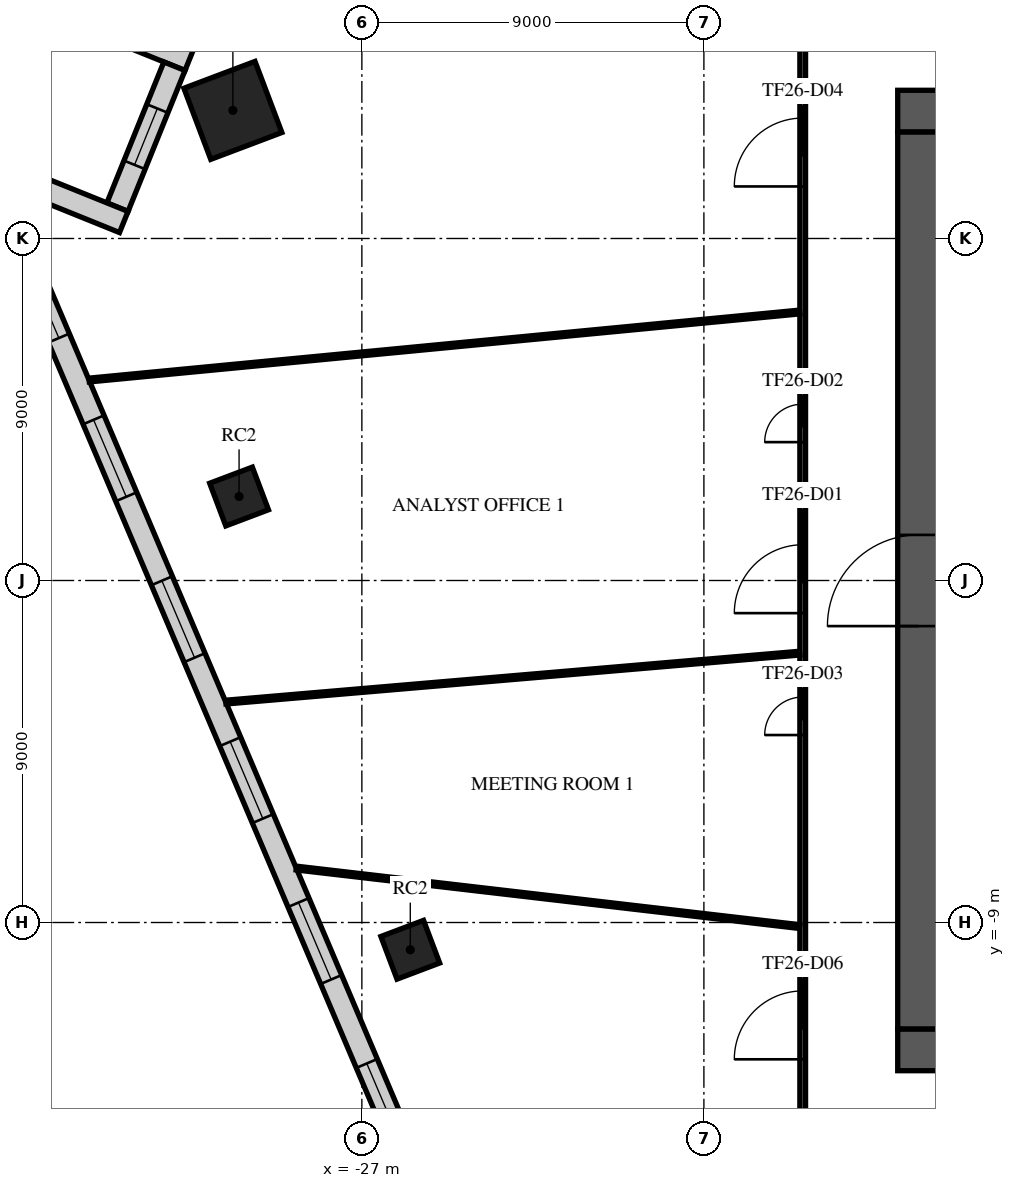
"""IFC4 building model, lengths in metres.
Left out: names, types, materials, properties, quantities, classifications, styles, units other than length and angle.
Written with IfcOpenShell. Run it as: python <this file> out.ifc"""

import sys

from ifc_helpers import new_model, si_unit, direction, frame, frame_2d, origin, origin_2d, place, context, subcontext, project, spatial, rectangle, extrude, element, fill, save


model = new_model("IFC4")
c1 = context("Model", 3, precision=1e-05, world=origin(), true_north=direction((0.0, 1.0)))
c2 = subcontext(c1, "Body", "Model", "MODEL_VIEW")
j1 = project(units=[si_unit("LENGTHUNIT", "METRE"), si_unit("PLANEANGLEUNIT", "RADIAN")], contexts=[c1])
p1 = place(None, origin())
s1 = spatial("IfcSite", under=j1, at=p1, CompositionType="ELEMENT")
p2 = place(p1, origin())
s2 = spatial("IfcBuilding", under=s1, at=p2, CompositionType="ELEMENT")
p3 = place(p2, frame((0.0, 0.0, 114.1)))
s3 = spatial("IfcBuildingStorey", under=s2, at=p3, CompositionType="ELEMENT", Elevation=114.1)
p4 = place(p3, frame((-30.394, 12.371, 0.0), z_axis=(0.0, 0.0, 1.0), x_axis=(0.935491525991, 0.353349125935, 0.0)))
e1 = element("IfcColumn", 1, at=p4, inside=s3, PredefinedType="COLUMN", context=c2, shape_type="SweptSolid", body=[
    extrude(rectangle(XDim=2.0, YDim=2.0, at=origin_2d()), origin(), (0.0, 0.0, 1.0), 4.0),
])
for number, where, z_axis, x_axis in (
    (2, (-30.231, 2.21, 0.0), (0.0, 0.0, 1.0), (0.935, 0.353, 0.0)),
    (3, (-25.726, -9.717, 0.0), (0.0, 0.0, 1.0), (0.935, 0.353, 0.0)),
):
    element("IfcColumn", number, at=place(p3, frame(where, z_axis=z_axis, x_axis=x_axis)), inside=s3, PredefinedType="COLUMN", context=c2, shape_type="SweptSolid", body=[
        extrude(rectangle(XDim=1.2, YDim=1.2, at=origin_2d()), origin(), (0.0, 0.0, 1.0), 4.0),
    ])
p5 = place(p3, frame((-12.9, 12.35, 0.0), z_axis=(0.0, 0.0, 1.0), x_axis=(1.0, 0.0, 0.0)))
e4 = element("IfcWall", 4, at=p5, inside=s3, PredefinedType="SHEAR", context=c2, shape_type="SweptSolid", body=[
    extrude(rectangle(XDim=25.8, YDim=1.1, at=frame_2d((12.9, 0.0))), origin(), (0.0, 0.0, 1.0), 3.58),
])
p6 = place(p5, frame((11.7, 0.0, 0.0)))
e5 = element("IfcOpeningElement", 5, at=p6, cuts=e4, PredefinedType="OPENING", context=c2, shape_type="SweptSolid", body=[
    extrude(rectangle(XDim=2.4, YDim=2.4, at=frame_2d((1.2, 1.2))), frame((0.0, 0.56, 0.0), z_axis=(0.0, -1.0, 0.0), x_axis=(1.0, 0.0, 0.0)), (0.0, 0.0, 1.0), 1.12),
])
p7 = place(p5, frame((22.525, 0.0, 0.0)))
e6 = element("IfcOpeningElement", 6, at=p7, cuts=e4, PredefinedType="OPENING", context=c2, shape_type="SweptSolid", body=[
    extrude(rectangle(XDim=1.2, YDim=2.1, at=frame_2d((0.6, 1.05))), frame((0.0, 0.56, 0.0), z_axis=(0.0, -1.0, 0.0), x_axis=(1.0, 0.0, 0.0)), (0.0, 0.0, 1.0), 1.12),
])
p8 = place(p5, frame((1.5, 0.0, 0.0)))
e7 = element("IfcOpeningElement", 7, at=p8, cuts=e4, PredefinedType="OPENING", context=c2, shape_type="SweptSolid", body=[
    extrude(rectangle(XDim=1.0, YDim=2.1, at=frame_2d((0.5, 1.05))), frame((0.0, 0.56, 0.0), z_axis=(0.0, -1.0, 0.0), x_axis=(1.0, 0.0, 0.0)), (0.0, 0.0, 1.0), 1.12),
])
p9 = place(p3, frame((-12.9, -12.35, 0.0), z_axis=(0.0, 0.0, 1.0), x_axis=(1.0, 0.0, 0.0)))
e8 = element("IfcWall", 8, at=p9, inside=s3, PredefinedType="SHEAR", context=c2, shape_type="SweptSolid", body=[
    extrude(rectangle(XDim=25.8, YDim=1.1, at=frame_2d((12.9, 0.0))), origin(), (0.0, 0.0, 1.0), 3.58),
])
p10 = place(p9, frame((7.8, 0.0, 0.0)))
e9 = element("IfcOpeningElement", 9, at=p10, cuts=e8, PredefinedType="OPENING", context=c2, shape_type="SweptSolid", body=[
    extrude(rectangle(XDim=2.0, YDim=2.1, at=frame_2d((1.0, 1.05))), frame((0.0, 0.56, 0.0), z_axis=(0.0, -1.0, 0.0), x_axis=(1.0, 0.0, 0.0)), (0.0, 0.0, 1.0), 1.12),
])
p11 = place(p9, frame((17.925, 0.0, 0.0)))
e10 = element("IfcOpeningElement", 10, at=p11, cuts=e8, PredefinedType="OPENING", context=c2, shape_type="SweptSolid", body=[
    extrude(rectangle(XDim=1.2, YDim=2.1, at=frame_2d((0.6, 1.05))), frame((0.0, 0.56, 0.0), z_axis=(0.0, -1.0, 0.0), x_axis=(1.0, 0.0, 0.0)), (0.0, 0.0, 1.0), 1.12),
])
p12 = place(p9, frame((2.075, 0.0, 0.0)))
e11 = element("IfcOpeningElement", 11, at=p12, cuts=e8, PredefinedType="OPENING", context=c2, shape_type="SweptSolid", body=[
    extrude(rectangle(XDim=1.2, YDim=2.1, at=frame_2d((0.6, 1.05))), frame((0.0, 0.56, 0.0), z_axis=(0.0, -1.0, 0.0), x_axis=(1.0, 0.0, 0.0)), (0.0, 0.0, 1.0), 1.12),
])
p13 = place(p9, frame((22.525, 0.0, 0.0)))
e12 = element("IfcOpeningElement", 12, at=p13, cuts=e8, PredefinedType="OPENING", context=c2, shape_type="SweptSolid", body=[
    extrude(rectangle(XDim=1.2, YDim=2.1, at=frame_2d((0.6, 1.05))), frame((0.0, 0.56, 0.0), z_axis=(0.0, -1.0, 0.0), x_axis=(1.0, 0.0, 0.0)), (0.0, 0.0, 1.0), 1.12),
])
p14 = place(p3, frame((-12.35, -11.8, 0.0), z_axis=(0.0, 0.0, 1.0), x_axis=(0.0, 1.0, 0.0)))
e13 = element("IfcWall", 13, at=p14, inside=s3, PredefinedType="SHEAR", context=c2, shape_type="SweptSolid", body=[
    extrude(rectangle(XDim=23.6, YDim=1.1, at=frame_2d((11.8, 0.0))), origin(), (0.0, 0.0, 1.0), 3.58),
])
p15 = place(p14, frame((10.6, 0.0, 0.0)))
e14 = element("IfcOpeningElement", 14, at=p15, cuts=e13, PredefinedType="OPENING", context=c2, shape_type="SweptSolid", body=[
    extrude(rectangle(XDim=2.4, YDim=2.4, at=frame_2d((1.2, 1.2))), frame((0.0, 0.56, 0.0), z_axis=(0.0, -1.0, 0.0), x_axis=(1.0, 0.0, 0.0)), (0.0, 0.0, 1.0), 1.12),
])
p16 = place(p3, frame((-33.86, 14.635, 0.0), z_axis=(0.0, 0.0, 1.0), x_axis=(0.927177918056, -0.374621286461, 0.0)))
e15 = element("IfcWall", 15, at=p16, inside=s3, PredefinedType="STANDARD", context=c2, shape_type="SweptSolid", body=[
    extrude(rectangle(XDim=2.5, YDim=0.6, at=frame_2d((1.25, 0.0))), origin(), (0.0, 0.0, 1.0), 3.58),
])
p17 = place(p3, frame((-31.932, 13.533, 0.0), z_axis=(0.0, 0.0, 1.0), x_axis=(-0.374629554127, -0.927174577507, 0.0)))
e16 = element("IfcWall", 16, at=p17, inside=s3, PredefinedType="STANDARD", context=c2, shape_type="SweptSolid", body=[
    extrude(rectangle(XDim=4.0, YDim=0.6, at=frame_2d((2.0, 0.0))), origin(), (0.0, 0.0, 1.0), 3.58),
])
p18 = place(p17, frame((1.2, 0.0, 0.9)))
e17 = element("IfcOpeningElement", 17, at=p18, cuts=e16, PredefinedType="OPENING", context=c2, shape_type="SweptSolid", body=[
    extrude(rectangle(XDim=1.6, YDim=2.1, at=frame_2d((0.8, 1.05))), frame((0.0, 0.31, 0.0), z_axis=(0.0, -1.0, 0.0), x_axis=(1.0, 0.0, 0.0)), (0.0, 0.0, 1.0), 0.62),
])
p19 = place(p3, frame((-33.265, 9.434, 0.0), z_axis=(0.0, 0.0, 1.0), x_axis=(-0.927177918056, 0.374621286461, 0.0)))
e18 = element("IfcWall", 18, at=p19, inside=s3, PredefinedType="STANDARD", context=c2, shape_type="SweptSolid", body=[
    extrude(rectangle(XDim=2.5, YDim=0.6, at=frame_2d((1.25, 0.0))), origin(), (0.0, 0.0, 1.0), 3.58),
])
p20 = place(p3, frame((-36.277, 9.452, 0.0), z_axis=(0.0, 0.0, 1.0), x_axis=(0.39073607599, -0.920502753347, 0.0)))
e19 = element("IfcWall", 19, at=p20, inside=s3, PredefinedType="STANDARD", context=c2, shape_type="SweptSolid", body=[
    extrude(rectangle(XDim=45.751, YDim=0.6, at=frame_2d((22.876, 0.0))), origin(), (0.0, 0.0, 1.0), 3.58),
])
p21 = place(p20, frame((1.138, 0.0, 0.9)))
e20 = element("IfcOpeningElement", 20, at=p21, cuts=e19, PredefinedType="OPENING", context=c2, shape_type="SweptSolid", body=[
    extrude(rectangle(XDim=2.2, YDim=2.1, at=frame_2d((1.1, 1.05))), frame((0.0, 0.31, 0.0), z_axis=(0.0, -1.0, 0.0), x_axis=(1.0, 0.0, 0.0)), (0.0, 0.0, 1.0), 0.62),
])
p22 = place(p20, frame((5.676, 0.0, 0.9)))
e21 = element("IfcOpeningElement", 21, at=p22, cuts=e19, PredefinedType="OPENING", context=c2, shape_type="SweptSolid", body=[
    extrude(rectangle(XDim=2.2, YDim=2.1, at=frame_2d((1.1, 1.05))), frame((0.0, 0.31, 0.0), z_axis=(0.0, -1.0, 0.0), x_axis=(1.0, 0.0, 0.0)), (0.0, 0.0, 1.0), 0.62),
])
p23 = place(p20, frame((10.276, 0.0, 0.9)))
e22 = element("IfcOpeningElement", 22, at=p23, cuts=e19, PredefinedType="OPENING", context=c2, shape_type="SweptSolid", body=[
    extrude(rectangle(XDim=2.2, YDim=2.1, at=frame_2d((1.1, 1.05))), frame((0.0, 0.31, 0.0), z_axis=(0.0, -1.0, 0.0), x_axis=(1.0, 0.0, 0.0)), (0.0, 0.0, 1.0), 0.62),
])
p24 = place(p20, frame((14.876, 0.0, 0.9)))
e23 = element("IfcOpeningElement", 23, at=p24, cuts=e19, PredefinedType="OPENING", context=c2, shape_type="SweptSolid", body=[
    extrude(rectangle(XDim=2.2, YDim=2.1, at=frame_2d((1.1, 1.05))), frame((0.0, 0.31, 0.0), z_axis=(0.0, -1.0, 0.0), x_axis=(1.0, 0.0, 0.0)), (0.0, 0.0, 1.0), 0.62),
])
p25 = place(p20, frame((19.476, 0.0, 0.9)))
e24 = element("IfcOpeningElement", 24, at=p25, cuts=e19, PredefinedType="OPENING", context=c2, shape_type="SweptSolid", body=[
    extrude(rectangle(XDim=2.2, YDim=2.1, at=frame_2d((1.1, 1.05))), frame((0.0, 0.31, 0.0), z_axis=(0.0, -1.0, 0.0), x_axis=(1.0, 0.0, 0.0)), (0.0, 0.0, 1.0), 0.62),
])
p26 = place(p20, frame((24.076, 0.0, 0.9)))
e25 = element("IfcOpeningElement", 25, at=p26, cuts=e19, PredefinedType="OPENING", context=c2, shape_type="SweptSolid", body=[
    extrude(rectangle(XDim=2.2, YDim=2.1, at=frame_2d((1.1, 1.05))), frame((0.0, 0.31, 0.0), z_axis=(0.0, -1.0, 0.0), x_axis=(1.0, 0.0, 0.0)), (0.0, 0.0, 1.0), 0.62),
])
p27 = place(p20, frame((28.676, 0.0, 0.9)))
e26 = element("IfcOpeningElement", 26, at=p27, cuts=e19, PredefinedType="OPENING", context=c2, shape_type="SweptSolid", body=[
    extrude(rectangle(XDim=2.2, YDim=2.1, at=frame_2d((1.1, 1.05))), frame((0.0, 0.31, 0.0), z_axis=(0.0, -1.0, 0.0), x_axis=(1.0, 0.0, 0.0)), (0.0, 0.0, 1.0), 0.62),
])
p28 = place(p20, frame((33.276, 0.0, 0.9)))
e27 = element("IfcOpeningElement", 27, at=p28, cuts=e19, PredefinedType="OPENING", context=c2, shape_type="SweptSolid", body=[
    extrude(rectangle(XDim=2.2, YDim=2.1, at=frame_2d((1.1, 1.05))), frame((0.0, 0.31, 0.0), z_axis=(0.0, -1.0, 0.0), x_axis=(1.0, 0.0, 0.0)), (0.0, 0.0, 1.0), 0.62),
])
p29 = place(p20, frame((37.876, 0.0, 0.9)))
e28 = element("IfcOpeningElement", 28, at=p29, cuts=e19, PredefinedType="OPENING", context=c2, shape_type="SweptSolid", body=[
    extrude(rectangle(XDim=2.2, YDim=2.1, at=frame_2d((1.1, 1.05))), frame((0.0, 0.31, 0.0), z_axis=(0.0, -1.0, 0.0), x_axis=(1.0, 0.0, 0.0)), (0.0, 0.0, 1.0), 0.62),
])
p30 = place(p20, frame((42.414, 0.0, 0.9)))
e29 = element("IfcOpeningElement", 29, at=p30, cuts=e19, PredefinedType="OPENING", context=c2, shape_type="SweptSolid", body=[
    extrude(rectangle(XDim=2.2, YDim=2.1, at=frame_2d((1.1, 1.05))), frame((0.0, 0.31, 0.0), z_axis=(0.0, -1.0, 0.0), x_axis=(1.0, 0.0, 0.0)), (0.0, 0.0, 1.0), 0.62),
])
p31 = place(p3, frame((-15.4, -15.4, 0.0), z_axis=(0.0, 0.0, 1.0), x_axis=(0.0, 1.0, 0.0)))
e30 = element("IfcWall", 30, at=p31, inside=s3, PredefinedType="PARTITIONING", context=c2, shape_type="SweptSolid", body=[
    extrude(rectangle(XDim=30.8, YDim=0.15, at=frame_2d((15.4, 0.0))), origin(), (0.0, 0.0, 1.0), 3.08),
])
p32 = place(p31, frame((14.541, 0.0, 0.0)))
e31 = element("IfcOpeningElement", 31, at=p32, cuts=e30, PredefinedType="OPENING", context=c2, shape_type="SweptSolid", body=[
    extrude(rectangle(XDim=1.8, YDim=2.1, at=frame_2d((0.9, 1.05))), frame((0.0, 0.085, 0.0), z_axis=(0.0, -1.0, 0.0), x_axis=(1.0, 0.0, 0.0)), (0.0, 0.0, 1.0), 0.17),
])
p33 = place(p31, frame((19.041, 0.0, 0.0)))
e32 = element("IfcOpeningElement", 32, at=p33, cuts=e30, PredefinedType="OPENING", context=c2, shape_type="SweptSolid", body=[
    extrude(rectangle(XDim=1.0, YDim=2.1, at=frame_2d((0.5, 1.05))), frame((0.0, 0.085, 0.0), z_axis=(0.0, -1.0, 0.0), x_axis=(1.0, 0.0, 0.0)), (0.0, 0.0, 1.0), 0.17),
])
p34 = place(p31, frame((11.333, 0.0, 0.0)))
e33 = element("IfcOpeningElement", 33, at=p34, cuts=e30, PredefinedType="OPENING", context=c2, shape_type="SweptSolid", body=[
    extrude(rectangle(XDim=1.0, YDim=2.1, at=frame_2d((0.5, 1.05))), frame((0.0, 0.085, 0.0), z_axis=(0.0, -1.0, 0.0), x_axis=(1.0, 0.0, 0.0)), (0.0, 0.0, 1.0), 0.17),
])
p35 = place(p31, frame((25.77, 0.0, 0.0)))
e34 = element("IfcOpeningElement", 34, at=p35, cuts=e30, PredefinedType="OPENING", context=c2, shape_type="SweptSolid", body=[
    extrude(rectangle(XDim=1.8, YDim=2.1, at=frame_2d((0.9, 1.05))), frame((0.0, 0.085, 0.0), z_axis=(0.0, -1.0, 0.0), x_axis=(1.0, 0.0, 0.0)), (0.0, 0.0, 1.0), 0.17),
])
p36 = place(p31, frame((2.8, 0.0, 0.0)))
e35 = element("IfcOpeningElement", 35, at=p36, cuts=e30, PredefinedType="OPENING", context=c2, shape_type="SweptSolid", body=[
    extrude(rectangle(XDim=1.8, YDim=2.1, at=frame_2d((0.9, 1.05))), frame((0.0, 0.085, 0.0), z_axis=(0.0, -1.0, 0.0), x_axis=(1.0, 0.0, 0.0)), (0.0, 0.0, 1.0), 0.17),
])
p37 = place(p3, frame((-34.176, 5.275, 0.0), z_axis=(0.0, 0.0, 1.0), x_axis=(0.995446676351, 0.095320063694, 0.0)))
e36 = element("IfcWall", 36, at=p37, inside=s3, PredefinedType="PARTITIONING", context=c2, shape_type="SweptSolid", body=[
    extrude(rectangle(XDim=18.782, YDim=0.1, at=frame_2d((9.391, 0.0))), origin(), (0.0, 0.0, 1.0), 2.83),
])
p38 = place(p3, frame((-30.579, -3.2, 0.0), z_axis=(0.0, 0.0, 1.0), x_axis=(0.996379708723, 0.085014563729, 0.0)))
e37 = element("IfcWall", 37, at=p38, inside=s3, PredefinedType="PARTITIONING", context=c2, shape_type="SweptSolid", body=[
    extrude(rectangle(XDim=15.154, YDim=0.1, at=frame_2d((7.577, 0.0))), origin(), (0.0, 0.0, 1.0), 2.83),
])
p39 = place(p3, frame((-28.725, -7.567, 0.0), z_axis=(0.0, 0.0, 1.0), x_axis=(0.993302982739, -0.115538670939, 0.0)))
e38 = element("IfcWall", 38, at=p39, inside=s3, PredefinedType="PARTITIONING", context=c2, shape_type="SweptSolid", body=[
    extrude(rectangle(XDim=13.333, YDim=0.1, at=frame_2d((6.667, 0.0))), origin(), (0.0, 0.0, 1.0), 2.83),
])
p40 = place(p15, origin())
e39 = element("IfcDoor", 39, at=p40, inside=s3, OperationType="SINGLE_SWING_LEFT", PredefinedType="DOOR", context=c2, shape_type="SweptSolid", body=[
    extrude(rectangle(XDim=2.4, YDim=2.4, at=frame_2d((1.2, 1.2))), frame((0.0, 0.025, 0.0), z_axis=(0.0, -1.0, 0.0), x_axis=(1.0, 0.0, 0.0)), (0.0, 0.0, 1.0), 0.05),
])
fill(e14, e39)
p41 = place(p18, origin())
e40 = element("IfcWindow", 40, at=p41, inside=s3, PartitioningType="SINGLE_PANEL", PredefinedType="WINDOW", context=c2, shape_type="SweptSolid", body=[
    extrude(rectangle(XDim=1.6, YDim=2.1, at=frame_2d((0.8, 1.05))), frame((0.0, 0.03, 0.0), z_axis=(0.0, -1.0, 0.0), x_axis=(1.0, 0.0, 0.0)), (0.0, 0.0, 1.0), 0.06),
])
fill(e17, e40)
p42 = place(p21, origin())
e41 = element("IfcWindow", 41, at=p42, inside=s3, PartitioningType="SINGLE_PANEL", PredefinedType="WINDOW", context=c2, shape_type="SweptSolid", body=[
    extrude(rectangle(XDim=2.2, YDim=2.1, at=frame_2d((1.1, 1.05))), frame((0.0, 0.03, 0.0), z_axis=(0.0, -1.0, 0.0), x_axis=(1.0, 0.0, 0.0)), (0.0, 0.0, 1.0), 0.06),
])
fill(e20, e41)
p43 = place(p22, origin())
e42 = element("IfcWindow", 42, at=p43, inside=s3, PartitioningType="SINGLE_PANEL", PredefinedType="WINDOW", context=c2, shape_type="SweptSolid", body=[
    extrude(rectangle(XDim=2.2, YDim=2.1, at=frame_2d((1.1, 1.05))), frame((0.0, 0.03, 0.0), z_axis=(0.0, -1.0, 0.0), x_axis=(1.0, 0.0, 0.0)), (0.0, 0.0, 1.0), 0.06),
])
fill(e21, e42)
p44 = place(p23, origin())
e43 = element("IfcWindow", 43, at=p44, inside=s3, PartitioningType="SINGLE_PANEL", PredefinedType="WINDOW", context=c2, shape_type="SweptSolid", body=[
    extrude(rectangle(XDim=2.2, YDim=2.1, at=frame_2d((1.1, 1.05))), frame((0.0, 0.03, 0.0), z_axis=(0.0, -1.0, 0.0), x_axis=(1.0, 0.0, 0.0)), (0.0, 0.0, 1.0), 0.06),
])
fill(e22, e43)
p45 = place(p24, origin())
e44 = element("IfcWindow", 44, at=p45, inside=s3, PartitioningType="SINGLE_PANEL", PredefinedType="WINDOW", context=c2, shape_type="SweptSolid", body=[
    extrude(rectangle(XDim=2.2, YDim=2.1, at=frame_2d((1.1, 1.05))), frame((0.0, 0.03, 0.0), z_axis=(0.0, -1.0, 0.0), x_axis=(1.0, 0.0, 0.0)), (0.0, 0.0, 1.0), 0.06),
])
fill(e23, e44)
p46 = place(p25, origin())
e45 = element("IfcWindow", 45, at=p46, inside=s3, PartitioningType="SINGLE_PANEL", PredefinedType="WINDOW", context=c2, shape_type="SweptSolid", body=[
    extrude(rectangle(XDim=2.2, YDim=2.1, at=frame_2d((1.1, 1.05))), frame((0.0, 0.03, 0.0), z_axis=(0.0, -1.0, 0.0), x_axis=(1.0, 0.0, 0.0)), (0.0, 0.0, 1.0), 0.06),
])
fill(e24, e45)
p47 = place(p26, origin())
e46 = element("IfcWindow", 46, at=p47, inside=s3, PartitioningType="SINGLE_PANEL", PredefinedType="WINDOW", context=c2, shape_type="SweptSolid", body=[
    extrude(rectangle(XDim=2.2, YDim=2.1, at=frame_2d((1.1, 1.05))), frame((0.0, 0.03, 0.0), z_axis=(0.0, -1.0, 0.0), x_axis=(1.0, 0.0, 0.0)), (0.0, 0.0, 1.0), 0.06),
])
fill(e25, e46)
p48 = place(p32, origin())
e47 = element("IfcDoor", 47, at=p48, inside=s3, OperationType="DOUBLE_DOOR_SINGLE_SWING", PredefinedType="DOOR", context=c2, shape_type="SweptSolid", body=[
    extrude(rectangle(XDim=1.8, YDim=2.1, at=frame_2d((0.9, 1.05))), frame((0.0, 0.025, 0.0), z_axis=(0.0, -1.0, 0.0), x_axis=(1.0, 0.0, 0.0)), (0.0, 0.0, 1.0), 0.05),
])
fill(e31, e47)
p49 = place(p33, origin())
e48 = element("IfcDoor", 48, at=p49, inside=s3, OperationType="SINGLE_SWING_LEFT", PredefinedType="DOOR", context=c2, shape_type="SweptSolid", body=[
    extrude(rectangle(XDim=1.0, YDim=2.1, at=frame_2d((0.5, 1.05))), frame((0.0, 0.025, 0.0), z_axis=(0.0, -1.0, 0.0), x_axis=(1.0, 0.0, 0.0)), (0.0, 0.0, 1.0), 0.05),
])
fill(e32, e48)
p50 = place(p34, origin())
e49 = element("IfcDoor", 49, at=p50, inside=s3, OperationType="SINGLE_SWING_RIGHT", PredefinedType="DOOR", context=c2, shape_type="SweptSolid", body=[
    extrude(rectangle(XDim=1.0, YDim=2.1, at=frame_2d((0.5, 1.05))), frame((0.0, 0.025, 0.0), z_axis=(0.0, -1.0, 0.0), x_axis=(1.0, 0.0, 0.0)), (0.0, 0.0, 1.0), 0.05),
])
fill(e33, e49)
p51 = place(p35, origin())
e50 = element("IfcDoor", 50, at=p51, inside=s3, OperationType="DOUBLE_DOOR_SINGLE_SWING", PredefinedType="DOOR", context=c2, shape_type="SweptSolid", body=[
    extrude(rectangle(XDim=1.8, YDim=2.1, at=frame_2d((0.9, 1.05))), frame((0.0, 0.025, 0.0), z_axis=(0.0, -1.0, 0.0), x_axis=(1.0, 0.0, 0.0)), (0.0, 0.0, 1.0), 0.05),
])
fill(e34, e50)
p52 = place(p36, origin())
e51 = element("IfcDoor", 51, at=p52, inside=s3, OperationType="DOUBLE_DOOR_SINGLE_SWING", PredefinedType="DOOR", context=c2, shape_type="SweptSolid", body=[
    extrude(rectangle(XDim=1.8, YDim=2.1, at=frame_2d((0.9, 1.05))), frame((0.0, 0.025, 0.0), z_axis=(0.0, -1.0, 0.0), x_axis=(1.0, 0.0, 0.0)), (0.0, 0.0, 1.0), 0.05),
])
fill(e35, e51)
save(model, sys.argv[1])
